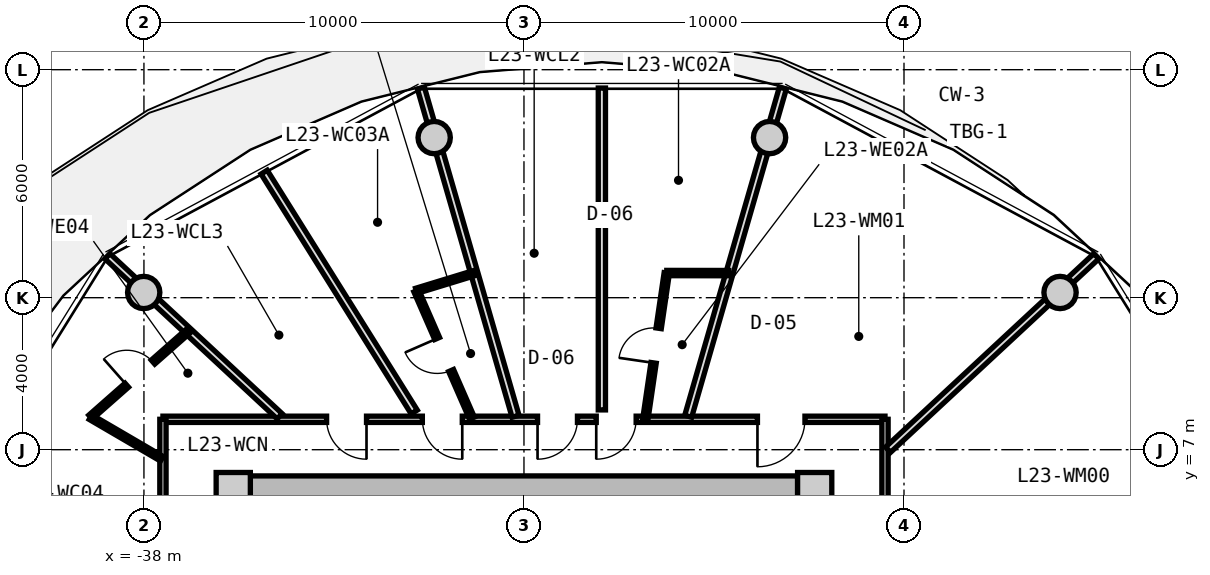
"""IFC4 building model, lengths in metres.
Left out: names, types, materials, properties, quantities, classifications, styles, units other than length and angle.
Written with IfcOpenShell. Run it as: python <this file> out.ifc"""

import sys

from ifc_helpers import new_model, si_unit, direction, frame, frame_2d, origin, origin_2d, place, context, subcontext, project, spatial, rectangle, circle, extrude, source, transform, mapped, element, fill, save


model = new_model("IFC4")
c1 = context("Model", 3, precision=1e-05, world=origin(), true_north=direction((0.0, 1.0)))
c2 = subcontext(c1, "Body", "Model", "MODEL_VIEW")
j1 = project(units=[si_unit("LENGTHUNIT", "METRE"), si_unit("PLANEANGLEUNIT", "RADIAN")], contexts=[c1])
p1 = place(None, origin())
s1 = spatial("IfcSite", under=j1, at=p1, CompositionType="ELEMENT")
p2 = place(p1, origin())
s2 = spatial("IfcBuilding", under=s1, at=p2, CompositionType="ELEMENT")
p3 = place(p2, frame((0.0, 0.0, 77.95)))
s3 = spatial("IfcBuildingStorey", under=s2, at=p3, CompositionType="ELEMENT", Elevation=77.95)
m1 = source(origin(), c2, "Body", "SweptSolid", [
    extrude(rectangle(XDim=0.9, YDim=0.9, at=origin_2d()), origin(), (0.0, 0.0, 1.0), 3.05),
])
for number, where, z_axis, x_axis in (
    (1, (-20.35, 5.95, 0.0), (0.0, 0.0, 1.0), (1.0, 0.0, 0.0)),
    (2, (-35.65, 5.95, 0.0), (0.0, 0.0, 1.0), (1.0, 0.0, 0.0)),
):
    element("IfcColumn", number, at=place(p3, frame(where, z_axis=z_axis, x_axis=x_axis)), inside=s3, PredefinedType="COLUMN", context=c2, shape_type="MappedRepresentation", body=[
        mapped(m1, transform((0.0, 0.0, 0.0), x_axis=(1.0, 0.0, 0.0), y_axis=(0.0, 1.0, 0.0), z_axis=(0.0, 0.0, 1.0), scale=1.0)),
    ])
m2 = source(origin(), c2, "Body", "SweptSolid", [
    extrude(rectangle(XDim=14.4, YDim=0.72, at=frame_2d((7.2, 0.0))), origin(), (0.0, 0.0, 1.0), 2.79),
])
p4 = place(p3, frame((-35.2, 5.95, 0.0), z_axis=(0.0, 0.0, 1.0), x_axis=(1.0, 0.0, 0.0)))
e3 = element("IfcWall", 3, at=p4, inside=s3, PredefinedType="SHEAR", context=c2, shape_type="MappedRepresentation", body=[
    mapped(m2, transform((0.0, 0.0, 0.0), x_axis=(1.0, 0.0, 0.0), y_axis=(0.0, 1.0, 0.0), z_axis=(0.0, 0.0, 1.0), scale=1.0)),
])
m3 = source(origin(), c2, "Body", "SweptSolid", [
    extrude(circle(Radius=0.425, at=origin_2d()), origin(), (0.0, 0.0, 1.0), 3.47),
])
for number, where, z_axis, x_axis in (
    (4, (-13.894, 11.137, -0.42), (0.0, 0.0, 1.0), (1.0, 0.0, 0.0)),
    (5, (-21.537, 15.213, -0.42), (0.0, 0.0, 1.0), (1.0, 0.0, 0.0)),
    (6, (-30.363, 15.213, -0.42), (0.0, 0.0, 1.0), (1.0, 0.0, 0.0)),
    (7, (-38.006, 11.137, -0.42), (0.0, 0.0, 1.0), (1.0, 0.0, 0.0)),
):
    element("IfcColumn", number, at=place(p3, frame(where, z_axis=z_axis, x_axis=x_axis)), inside=s3, PredefinedType="COLUMN", context=c2, shape_type="MappedRepresentation", body=[
        mapped(m3, transform((0.0, 0.0, 0.0), x_axis=(1.0, 0.0, 0.0), y_axis=(0.0, 1.0, 0.0), z_axis=(0.0, 0.0, 1.0), scale=1.0)),
    ])
m4 = source(origin(), c2, "Body", "SweptSolid", [
    extrude(rectangle(XDim=19.0, YDim=0.165, at=frame_2d((9.5, 0.0))), origin(), (0.0, 0.0, 1.0), 2.775),
])
p5 = place(p3, frame((-37.5, 7.8, 0.0), z_axis=(0.0, 0.0, 1.0), x_axis=(1.0, 0.0, 0.0)))
e8 = element("IfcWall", 8, at=p5, inside=s3, PredefinedType="PARTITIONING", context=c2, shape_type="MappedRepresentation", body=[
    mapped(m4, transform((0.0, 0.0, 0.0), x_axis=(1.0, 0.0, 0.0), y_axis=(0.0, 1.0, 0.0), z_axis=(0.0, 0.0, 1.0), scale=1.0)),
])
p6 = place(p5, frame((15.644, 0.0, 0.0)))
e9 = element("IfcOpeningElement", 9, at=p6, cuts=e8, PredefinedType="OPENING", context=c2, shape_type="SweptSolid", body=[
    extrude(rectangle(XDim=1.25, YDim=2.2, at=frame_2d((0.625, 1.1))), frame((0.0, 0.093, 0.0), z_axis=(0.0, -1.0, 0.0), x_axis=(1.0, 0.0, 0.0)), (0.0, 0.0, 1.0), 0.185),
])
p7 = place(p5, frame((11.402, 0.0, 0.0)))
e10 = element("IfcOpeningElement", 10, at=p7, cuts=e8, PredefinedType="OPENING", context=c2, shape_type="SweptSolid", body=[
    extrude(rectangle(XDim=1.05, YDim=2.15, at=frame_2d((0.525, 1.075))), frame((0.0, 0.093, 0.0), z_axis=(0.0, -1.0, 0.0), x_axis=(1.0, 0.0, 0.0)), (0.0, 0.0, 1.0), 0.185),
])
p8 = place(p5, frame((9.857, 0.0, 0.0)))
e11 = element("IfcOpeningElement", 11, at=p8, cuts=e8, PredefinedType="OPENING", context=c2, shape_type="SweptSolid", body=[
    extrude(rectangle(XDim=1.05, YDim=2.15, at=frame_2d((0.525, 1.075))), frame((0.0, 0.093, 0.0), z_axis=(0.0, -1.0, 0.0), x_axis=(1.0, 0.0, 0.0)), (0.0, 0.0, 1.0), 0.185),
])
p9 = place(p5, frame((6.826, 0.0, 0.0)))
e12 = element("IfcOpeningElement", 12, at=p9, cuts=e8, PredefinedType="OPENING", context=c2, shape_type="SweptSolid", body=[
    extrude(rectangle(XDim=1.05, YDim=2.15, at=frame_2d((0.525, 1.075))), frame((0.0, 0.093, 0.0), z_axis=(0.0, -1.0, 0.0), x_axis=(1.0, 0.0, 0.0)), (0.0, 0.0, 1.0), 0.185),
])
p10 = place(p5, frame((4.307, 0.0, 0.0)))
e13 = element("IfcOpeningElement", 13, at=p10, cuts=e8, PredefinedType="OPENING", context=c2, shape_type="SweptSolid", body=[
    extrude(rectangle(XDim=1.05, YDim=2.15, at=frame_2d((0.525, 1.075))), frame((0.0, 0.093, 0.0), z_axis=(0.0, -1.0, 0.0), x_axis=(1.0, 0.0, 0.0)), (0.0, 0.0, 1.0), 0.185),
])
m5 = source(origin(), c2, "Body", "SweptSolid", [
    extrude(rectangle(XDim=15.6, YDim=0.165, at=frame_2d((7.8, 0.0))), origin(), (0.0, 0.0, 1.0), 2.775),
])
p11 = place(p3, frame((-37.5, -7.8, 0.0), z_axis=(0.0, 0.0, 1.0), x_axis=(0.0, 1.0, 0.0)))
e14 = element("IfcWall", 14, at=p11, inside=s3, PredefinedType="PARTITIONING", context=c2, shape_type="MappedRepresentation", body=[
    mapped(m5, transform((0.0, 0.0, 0.0), x_axis=(1.0, 0.0, 0.0), y_axis=(0.0, 1.0, 0.0), z_axis=(0.0, 0.0, 1.0), scale=1.0)),
])
p12 = place(p11, frame((11.994, 0.0, 0.0)))
e15 = element("IfcOpeningElement", 15, at=p12, cuts=e14, PredefinedType="OPENING", context=c2, shape_type="SweptSolid", body=[
    extrude(rectangle(XDim=1.25, YDim=2.2, at=frame_2d((0.625, 1.1))), frame((0.0, 0.093, 0.0), z_axis=(0.0, -1.0, 0.0), x_axis=(1.0, 0.0, 0.0)), (0.0, 0.0, 1.0), 0.185),
])
p13 = place(p11, frame((8.723, 0.0, 0.0)))
e16 = element("IfcOpeningElement", 16, at=p13, cuts=e14, PredefinedType="OPENING", context=c2, shape_type="SweptSolid", body=[
    extrude(rectangle(XDim=1.05, YDim=2.15, at=frame_2d((0.525, 1.075))), frame((0.0, 0.093, 0.0), z_axis=(0.0, -1.0, 0.0), x_axis=(1.0, 0.0, 0.0)), (0.0, 0.0, 1.0), 0.185),
])
p14 = place(p11, frame((5.777, 0.0, 0.0)))
e17 = element("IfcOpeningElement", 17, at=p14, cuts=e14, PredefinedType="OPENING", context=c2, shape_type="SweptSolid", body=[
    extrude(rectangle(XDim=1.05, YDim=2.15, at=frame_2d((0.525, 1.075))), frame((0.0, 0.093, 0.0), z_axis=(0.0, -1.0, 0.0), x_axis=(1.0, 0.0, 0.0)), (0.0, 0.0, 1.0), 0.185),
])
p15 = place(p11, frame((2.676, 0.0, 0.0)))
e18 = element("IfcOpeningElement", 18, at=p15, cuts=e14, PredefinedType="OPENING", context=c2, shape_type="SweptSolid", body=[
    extrude(rectangle(XDim=1.05, YDim=2.15, at=frame_2d((0.525, 1.075))), frame((0.0, 0.093, 0.0), z_axis=(0.0, -1.0, 0.0), x_axis=(1.0, 0.0, 0.0)), (0.0, 0.0, 1.0), 0.185),
])
p16 = place(p3, frame((-18.5, 7.8, 0.0), z_axis=(0.0, 0.0, 1.0), x_axis=(0.0, -1.0, 0.0)))
e19 = element("IfcWall", 19, at=p16, inside=s3, PredefinedType="PARTITIONING", context=c2, shape_type="MappedRepresentation", body=[
    mapped(m5, transform((0.0, 0.0, 0.0), x_axis=(1.0, 0.0, 0.0), y_axis=(0.0, 1.0, 0.0), z_axis=(0.0, 0.0, 1.0), scale=1.0)),
])
p17 = place(p16, frame((11.664, 0.0, 0.0)))
e20 = element("IfcOpeningElement", 20, at=p17, cuts=e19, PredefinedType="OPENING", context=c2, shape_type="SweptSolid", body=[
    extrude(rectangle(XDim=1.25, YDim=2.2, at=frame_2d((0.625, 1.1))), frame((0.0, 0.093, 0.0), z_axis=(0.0, -1.0, 0.0), x_axis=(1.0, 0.0, 0.0)), (0.0, 0.0, 1.0), 0.185),
])
p18 = place(p16, frame((7.175, 0.0, 0.0)))
e21 = element("IfcOpeningElement", 21, at=p18, cuts=e19, PredefinedType="OPENING", context=c2, shape_type="SweptSolid", body=[
    extrude(rectangle(XDim=1.25, YDim=2.2, at=frame_2d((0.625, 1.1))), frame((0.0, 0.093, 0.0), z_axis=(0.0, -1.0, 0.0), x_axis=(1.0, 0.0, 0.0)), (0.0, 0.0, 1.0), 0.185),
])
p19 = place(p16, frame((2.686, 0.0, 0.0)))
e22 = element("IfcOpeningElement", 22, at=p19, cuts=e19, PredefinedType="OPENING", context=c2, shape_type="SweptSolid", body=[
    extrude(rectangle(XDim=1.25, YDim=2.2, at=frame_2d((0.625, 1.1))), frame((0.0, 0.093, 0.0), z_axis=(0.0, -1.0, 0.0), x_axis=(1.0, 0.0, 0.0)), (0.0, 0.0, 1.0), 0.185),
])
m6 = source(origin(), c2, "Body", "SweptSolid", [
    extrude(rectangle(XDim=7.482, YDim=0.19, at=frame_2d((3.741, 0.0))), origin(), (0.0, 0.0, 1.0), 2.275),
])
p20 = place(p3, frame((-18.42, 6.998, 0.0), z_axis=(0.0, 0.0, 1.0), x_axis=(0.732508698043, 0.680757671489, 0.0)))
e23 = element("IfcWall", 23, at=p20, inside=s3, PredefinedType="PARTITIONING", context=c2, shape_type="MappedRepresentation", body=[
    mapped(m6, transform((0.0, 0.0, 0.0), x_axis=(1.0, 0.0, 0.0), y_axis=(0.0, 1.0, 0.0), z_axis=(0.0, 0.0, 1.0), scale=1.0)),
])
m7 = source(origin(), c2, "Body", "SweptSolid", [
    extrude(rectangle(XDim=8.989, YDim=0.19, at=frame_2d((4.495, 0.0))), origin(), (0.0, 0.0, 1.0), 2.275),
])
for number, where, z_axis, x_axis in (
    (24, (-23.678, 7.88, 0.0), (0.0, 0.0, 1.0), (0.277, 0.961, 0.0)),
    (25, (-28.222, 7.88, 0.0), (0.0, 0.0, 1.0), (-0.277, 0.961, 0.0)),
):
    element("IfcWall", number, at=place(p3, frame(where, z_axis=z_axis, x_axis=x_axis)), inside=s3, PredefinedType="PARTITIONING", context=c2, shape_type="MappedRepresentation", body=[
        mapped(m7, transform((0.0, 0.0, 0.0), x_axis=(1.0, 0.0, 0.0), y_axis=(0.0, 1.0, 0.0), z_axis=(0.0, 0.0, 1.0), scale=1.0)),
    ])
m8 = source(origin(), c2, "Body", "SweptSolid", [
    extrude(rectangle(XDim=8.47, YDim=0.19, at=frame_2d((4.235, 0.0))), origin(), (0.0, 0.0, 1.0), 2.775),
])
p21 = place(p3, frame((-25.95, 8.047, 0.0), z_axis=(0.0, 0.0, 1.0), x_axis=(0.0, 1.0, 0.0)))
e26 = element("IfcWall", 26, at=p21, inside=s3, PredefinedType="PARTITIONING", context=c2, shape_type="MappedRepresentation", body=[
    mapped(m8, transform((0.0, 0.0, 0.0), x_axis=(1.0, 0.0, 0.0), y_axis=(0.0, 1.0, 0.0), z_axis=(0.0, 0.0, 1.0), scale=1.0)),
])
m9 = source(origin(), c2, "Body", "SweptSolid", [
    extrude(rectangle(XDim=3.86, YDim=0.14, at=frame_2d((1.93, 0.0))), origin(), (0.0, 0.0, 1.0), 2.275),
])
p22 = place(p3, frame((-24.802, 7.83, 0.0), z_axis=(0.0, 0.0, 1.0), x_axis=(0.145042357075, 0.989425446739, 0.0)))
e27 = element("IfcWall", 27, at=p22, inside=s3, PredefinedType="PARTITIONING", context=c2, shape_type="MappedRepresentation", body=[
    mapped(m9, transform((0.0, 0.0, 0.0), x_axis=(1.0, 0.0, 0.0), y_axis=(0.0, 1.0, 0.0), z_axis=(0.0, 0.0, 1.0), scale=1.0)),
])
p23 = place(p22, frame((1.47, 0.0, 0.0)))
e28 = element("IfcOpeningElement", 28, at=p23, cuts=e27, PredefinedType="OPENING", context=c2, shape_type="SweptSolid", body=[
    extrude(rectangle(XDim=0.92, YDim=2.1, at=frame_2d((0.46, 1.05))), frame((0.0, 0.08, 0.0), z_axis=(0.0, -1.0, 0.0), x_axis=(1.0, 0.0, 0.0)), (0.0, 0.0, 1.0), 0.16),
])
m10 = source(origin(), c2, "Body", "SweptSolid", [
    extrude(rectangle(XDim=1.632, YDim=0.14, at=frame_2d((0.816, 0.0))), origin(), (0.0, 0.0, 1.0), 2.775),
])
p24 = place(p3, frame((-24.242, 11.649, 0.0), z_axis=(0.0, 0.0, 1.0), x_axis=(0.999999093743, -0.001346296461, 0.0)))
e29 = element("IfcWall", 29, at=p24, inside=s3, PredefinedType="PARTITIONING", context=c2, shape_type="MappedRepresentation", body=[
    mapped(m10, transform((0.0, 0.0, 0.0), x_axis=(1.0, 0.0, 0.0), y_axis=(0.0, 1.0, 0.0), z_axis=(0.0, 0.0, 1.0), scale=1.0)),
])
m11 = source(origin(), c2, "Body", "SweptSolid", [
    extrude(rectangle(XDim=6.187, YDim=0.19, at=frame_2d((3.093, 0.0))), origin(), (0.0, 0.0, 1.0), 2.275),
])
p25 = place(p3, frame((-34.429, 7.88, 0.0), z_axis=(0.0, 0.0, 1.0), x_axis=(-0.732501077882, 0.680765870841, 0.0)))
e30 = element("IfcWall", 30, at=p25, inside=s3, PredefinedType="PARTITIONING", context=c2, shape_type="MappedRepresentation", body=[
    mapped(m11, transform((0.0, 0.0, 0.0), x_axis=(1.0, 0.0, 0.0), y_axis=(0.0, 1.0, 0.0), z_axis=(0.0, 0.0, 1.0), scale=1.0)),
])
m12 = source(origin(), c2, "Body", "SweptSolid", [
    extrude(rectangle(XDim=7.446, YDim=0.19, at=frame_2d((3.723, 0.0))), origin(), (0.0, 0.0, 1.0), 2.775),
])
p26 = place(p3, frame((-30.888, 7.992, 0.0), z_axis=(0.0, 0.0, 1.0), x_axis=(-0.530320174828, 0.847797447608, 0.0)))
e31 = element("IfcWall", 31, at=p26, inside=s3, PredefinedType="PARTITIONING", context=c2, shape_type="MappedRepresentation", body=[
    mapped(m12, transform((0.0, 0.0, 0.0), x_axis=(1.0, 0.0, 0.0), y_axis=(0.0, 1.0, 0.0), z_axis=(0.0, 0.0, 1.0), scale=1.0)),
])
m13 = source(origin(), c2, "Body", "SweptSolid", [
    extrude(rectangle(XDim=3.656, YDim=0.14, at=frame_2d((1.828, 0.0))), origin(), (0.0, 0.0, 1.0), 2.775),
])
p27 = place(p3, frame((-29.369, 7.83, 0.0), z_axis=(0.0, 0.0, 1.0), x_axis=(-0.400212690223, 0.916422283985, 0.0)))
e32 = element("IfcWall", 32, at=p27, inside=s3, PredefinedType="PARTITIONING", context=c2, shape_type="MappedRepresentation", body=[
    mapped(m13, transform((0.0, 0.0, 0.0), x_axis=(1.0, 0.0, 0.0), y_axis=(0.0, 1.0, 0.0), z_axis=(0.0, 0.0, 1.0), scale=1.0)),
])
p28 = place(p27, frame((1.368, 0.0, 0.0)))
e33 = element("IfcOpeningElement", 33, at=p28, cuts=e32, PredefinedType="OPENING", context=c2, shape_type="SweptSolid", body=[
    extrude(rectangle(XDim=0.92, YDim=2.1, at=frame_2d((0.46, 1.05))), frame((0.0, 0.08, 0.0), z_axis=(0.0, -1.0, 0.0), x_axis=(1.0, 0.0, 0.0)), (0.0, 0.0, 1.0), 0.16),
])
m14 = source(origin(), c2, "Body", "SweptSolid", [
    extrude(rectangle(XDim=1.612, YDim=0.14, at=frame_2d((0.806, 0.0))), origin(), (0.0, 0.0, 1.0), 2.775),
])
p29 = place(p3, frame((-30.833, 11.18, 0.0), z_axis=(0.0, 0.0, 1.0), x_axis=(0.956236281577, 0.292595580616, 0.0)))
e34 = element("IfcWall", 34, at=p29, inside=s3, PredefinedType="PARTITIONING", context=c2, shape_type="MappedRepresentation", body=[
    mapped(m14, transform((0.0, 0.0, 0.0), x_axis=(1.0, 0.0, 0.0), y_axis=(0.0, 1.0, 0.0), z_axis=(0.0, 0.0, 1.0), scale=1.0)),
])
m15 = source(origin(), c2, "Body", "SweptSolid", [
    extrude(rectangle(XDim=2.172, YDim=0.14, at=frame_2d((1.086, 0.0))), origin(), (0.0, 0.0, 1.0), 2.775),
])
p30 = place(p3, frame((-37.53, 6.762, 0.0), z_axis=(0.0, 0.0, 1.0), x_axis=(-0.863562702562, 0.504241468688, 0.0)))
e35 = element("IfcWall", 35, at=p30, inside=s3, PredefinedType="PARTITIONING", context=c2, shape_type="MappedRepresentation", body=[
    mapped(m15, transform((0.0, 0.0, 0.0), x_axis=(1.0, 0.0, 0.0), y_axis=(0.0, 1.0, 0.0), z_axis=(0.0, 0.0, 1.0), scale=1.0)),
])
m16 = source(origin(), c2, "Body", "SweptSolid", [
    extrude(rectangle(XDim=3.462, YDim=0.14, at=frame_2d((1.731, 0.0))), origin(), (0.0, 0.0, 1.0), 2.775),
])
p31 = place(p3, frame((-39.405, 7.857, 0.0), z_axis=(0.0, 0.0, 1.0), x_axis=(0.75036232563, 0.661026762148, 0.0)))
e36 = element("IfcWall", 36, at=p31, inside=s3, PredefinedType="PARTITIONING", context=c2, shape_type="MappedRepresentation", body=[
    mapped(m16, transform((0.0, 0.0, 0.0), x_axis=(1.0, 0.0, 0.0), y_axis=(0.0, 1.0, 0.0), z_axis=(0.0, 0.0, 1.0), scale=1.0)),
])
p32 = place(p31, frame((1.271, 0.0, 0.0)))
e37 = element("IfcOpeningElement", 37, at=p32, cuts=e36, PredefinedType="OPENING", context=c2, shape_type="SweptSolid", body=[
    extrude(rectangle(XDim=0.92, YDim=2.1, at=frame_2d((0.46, 1.05))), frame((0.0, 0.08, 0.0), z_axis=(0.0, -1.0, 0.0), x_axis=(1.0, 0.0, 0.0)), (0.0, 0.0, 1.0), 0.16),
])
m17 = source(origin(), c2, "Body", "SweptSolid", [
    extrude(rectangle(XDim=1.25, YDim=2.2, at=frame_2d((0.625, 1.1))), frame((0.0, 0.025, 0.0), z_axis=(0.0, -1.0, 0.0), x_axis=(1.0, 0.0, 0.0)), (0.0, 0.0, 1.0), 0.05),
])
p33 = place(p6, frame((1.25, 0.0, 0.0), z_axis=(0.0, 0.0, 1.0), x_axis=(-1.0, 0.0, 0.0)))
e38 = element("IfcDoor", 38, at=p33, inside=s3, OperationType="SINGLE_SWING_RIGHT", PredefinedType="DOOR", context=c2, shape_type="MappedRepresentation", body=[
    mapped(m17, transform((0.0, 0.0, 0.0), x_axis=(1.0, 0.0, 0.0), y_axis=(0.0, 1.0, 0.0), z_axis=(0.0, 0.0, 1.0), scale=1.0)),
])
fill(e9, e38)
m18 = source(origin(), c2, "Body", "SweptSolid", [
    extrude(rectangle(XDim=1.05, YDim=2.15, at=frame_2d((0.525, 1.075))), frame((0.0, 0.025, 0.0), z_axis=(0.0, -1.0, 0.0), x_axis=(1.0, 0.0, 0.0)), (0.0, 0.0, 1.0), 0.05),
])
p34 = place(p7, frame((1.05, 0.0, 0.0), z_axis=(0.0, 0.0, 1.0), x_axis=(-1.0, 0.0, 0.0)))
e39 = element("IfcDoor", 39, at=p34, inside=s3, OperationType="SINGLE_SWING_RIGHT", PredefinedType="DOOR", context=c2, shape_type="MappedRepresentation", body=[
    mapped(m18, transform((0.0, 0.0, 0.0), x_axis=(1.0, 0.0, 0.0), y_axis=(0.0, 1.0, 0.0), z_axis=(0.0, 0.0, 1.0), scale=1.0)),
])
fill(e10, e39)
m19 = source(origin(), c2, "Body", "SweptSolid", [
    extrude(rectangle(XDim=0.92, YDim=2.1, at=frame_2d((0.46, 1.05))), frame((0.0, 0.025, 0.0), z_axis=(0.0, -1.0, 0.0), x_axis=(1.0, 0.0, 0.0)), (0.0, 0.0, 1.0), 0.05),
])
p35 = place(p23, origin())
e40 = element("IfcDoor", 40, at=p35, inside=s3, OperationType="SINGLE_SWING_LEFT", PredefinedType="DOOR", context=c2, shape_type="MappedRepresentation", body=[
    mapped(m19, transform((0.0, 0.0, 0.0), x_axis=(1.0, 0.0, 0.0), y_axis=(0.0, 1.0, 0.0), z_axis=(0.0, 0.0, 1.0), scale=1.0)),
])
fill(e28, e40)
p36 = place(p8, frame((1.05, 0.0, 0.0), z_axis=(0.0, 0.0, 1.0), x_axis=(-1.0, 0.0, 0.0)))
e41 = element("IfcDoor", 41, at=p36, inside=s3, OperationType="SINGLE_SWING_RIGHT", PredefinedType="DOOR", context=c2, shape_type="MappedRepresentation", body=[
    mapped(m18, transform((0.0, 0.0, 0.0), x_axis=(1.0, 0.0, 0.0), y_axis=(0.0, 1.0, 0.0), z_axis=(0.0, 0.0, 1.0), scale=1.0)),
])
fill(e11, e41)
p37 = place(p9, frame((1.05, 0.0, 0.0), z_axis=(0.0, 0.0, 1.0), x_axis=(-1.0, 0.0, 0.0)))
e42 = element("IfcDoor", 42, at=p37, inside=s3, OperationType="SINGLE_SWING_LEFT", PredefinedType="DOOR", context=c2, shape_type="MappedRepresentation", body=[
    mapped(m18, transform((0.0, 0.0, 0.0), x_axis=(1.0, 0.0, 0.0), y_axis=(0.0, 1.0, 0.0), z_axis=(0.0, 0.0, 1.0), scale=1.0)),
])
fill(e12, e42)
p38 = place(p28, origin())
e43 = element("IfcDoor", 43, at=p38, inside=s3, OperationType="SINGLE_SWING_RIGHT", PredefinedType="DOOR", context=c2, shape_type="MappedRepresentation", body=[
    mapped(m19, transform((0.0, 0.0, 0.0), x_axis=(1.0, 0.0, 0.0), y_axis=(0.0, 1.0, 0.0), z_axis=(0.0, 0.0, 1.0), scale=1.0)),
])
fill(e33, e43)
p39 = place(p10, frame((1.05, 0.0, 0.0), z_axis=(0.0, 0.0, 1.0), x_axis=(-1.0, 0.0, 0.0)))
e44 = element("IfcDoor", 44, at=p39, inside=s3, OperationType="SINGLE_SWING_LEFT", PredefinedType="DOOR", context=c2, shape_type="MappedRepresentation", body=[
    mapped(m18, transform((0.0, 0.0, 0.0), x_axis=(1.0, 0.0, 0.0), y_axis=(0.0, 1.0, 0.0), z_axis=(0.0, 0.0, 1.0), scale=1.0)),
])
fill(e13, e44)
p40 = place(p32, origin())
e45 = element("IfcDoor", 45, at=p40, inside=s3, OperationType="SINGLE_SWING_LEFT", PredefinedType="DOOR", context=c2, shape_type="MappedRepresentation", body=[
    mapped(m19, transform((0.0, 0.0, 0.0), x_axis=(1.0, 0.0, 0.0), y_axis=(0.0, 1.0, 0.0), z_axis=(0.0, 0.0, 1.0), scale=1.0)),
])
fill(e37, e45)
save(model, sys.argv[1])
